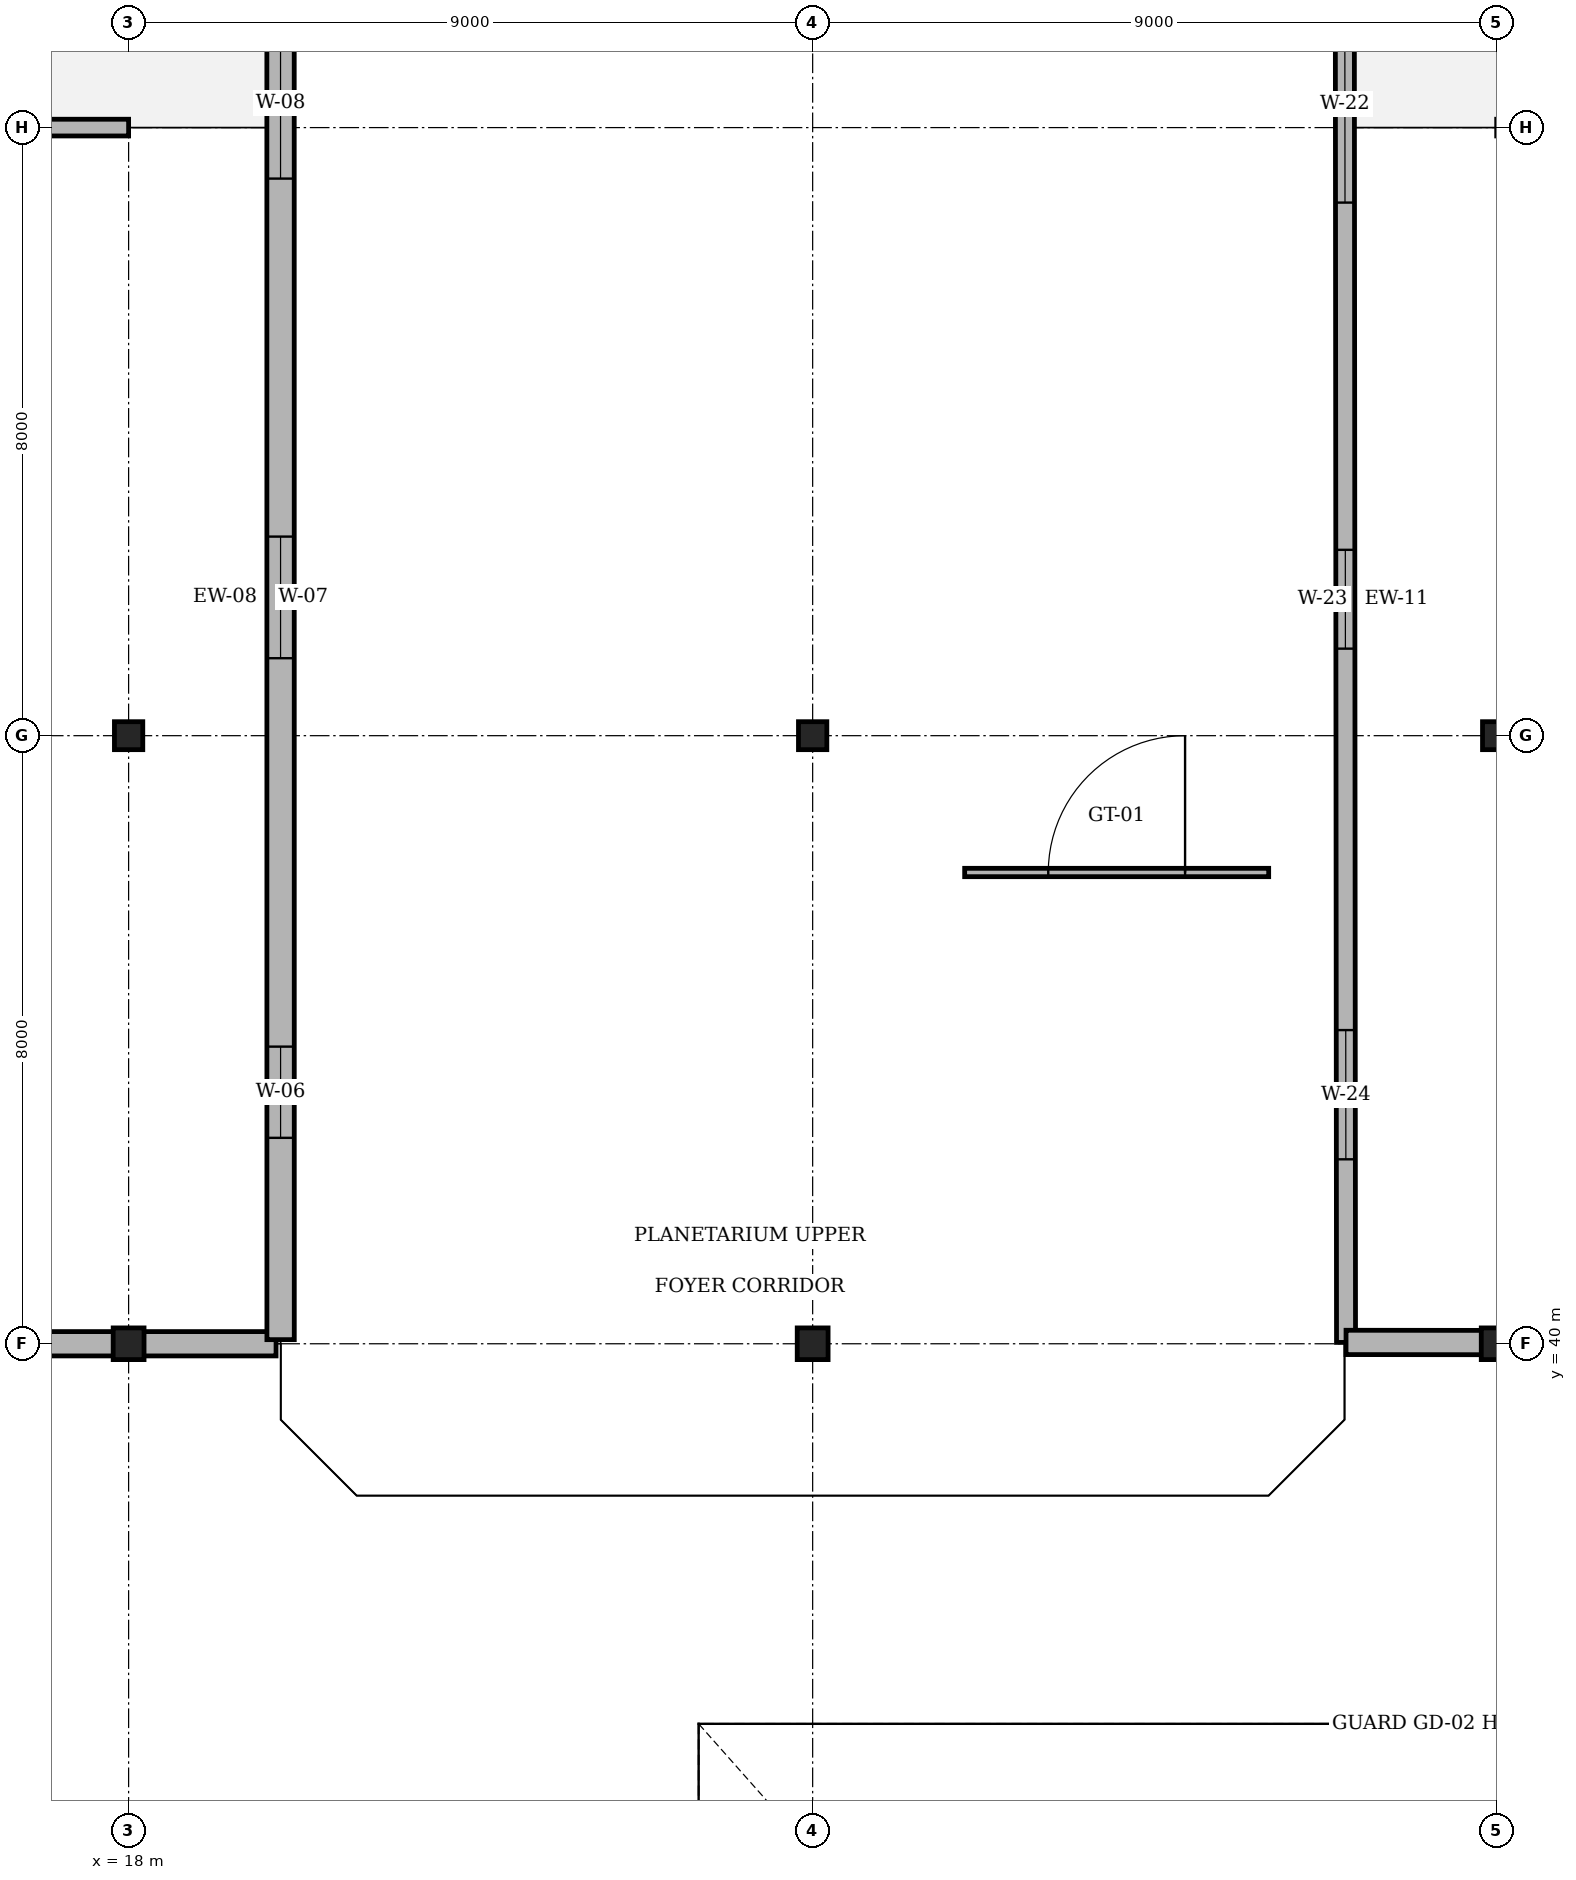
"""IFC4 building model, lengths in metres.
Left out: names, types, materials, properties, quantities, classifications, styles, units other than length and angle.
Written with IfcOpenShell. Run it as: python <this file> out.ifc"""

import sys

from ifc_helpers import new_model, si_unit, direction, frame, frame_2d, origin, origin_2d, place, context, subcontext, project, spatial, rectangle, i_section, extrude, element, fill, save


model = new_model("IFC4")
c1 = context("Model", 3, precision=1e-05, world=origin(), true_north=direction((0.0, 1.0)))
c2 = subcontext(c1, "Body", "Model", "MODEL_VIEW")
j1 = project(units=[si_unit("LENGTHUNIT", "METRE"), si_unit("PLANEANGLEUNIT", "RADIAN")], contexts=[c1])
p1 = place(None, origin())
s1 = spatial("IfcSite", under=j1, at=p1, CompositionType="ELEMENT")
p2 = place(p1, origin())
s2 = spatial("IfcBuilding", under=s1, at=p2, CompositionType="ELEMENT")
p3 = place(p2, frame((0.0, 0.0, 5.4)))
s3 = spatial("IfcBuildingStorey", under=s2, at=p3, CompositionType="ELEMENT", Elevation=5.4)
for number, where, z_axis, x_axis in (
    (1, (18.0, 48.0, 0.0), (0.0, 0.0, 1.0), (1.0, 0.0, 0.0)),
    (2, (27.0, 48.0, 0.0), (0.0, 0.0, 1.0), (1.0, 0.0, 0.0)),
    (3, (36.0, 48.0, 0.0), (0.0, 0.0, 1.0), (1.0, 0.0, 0.0)),
):
    element("IfcColumn", number, at=place(p3, frame(where, z_axis=z_axis, x_axis=x_axis)), inside=s3, PredefinedType="COLUMN", context=c2, shape_type="SweptSolid", body=[
        extrude(i_section(OverallWidth=0.373, OverallDepth=0.368, WebThickness=0.015, FlangeThickness=0.024, FilletRadius=0.015, at=origin_2d()), origin(), (0.0, 0.0, 1.0), 5.4),
    ])
for number, where, z_axis, x_axis in (
    (4, (18.0, 40.0, 0.0), (0.0, 0.0, 1.0), (1.0, 0.0, 0.0)),
    (5, (27.0, 40.0, 0.0), (0.0, 0.0, 1.0), (1.0, 0.0, 0.0)),
    (6, (36.0, 40.0, 0.0), (0.0, 0.0, 1.0), (1.0, 0.0, 0.0)),
):
    element("IfcColumn", number, at=place(p3, frame(where, z_axis=z_axis, x_axis=x_axis)), inside=s3, PredefinedType="COLUMN", context=c2, shape_type="SweptSolid", body=[
        extrude(i_section(OverallWidth=0.406, OverallDepth=0.417, WebThickness=0.03, FlangeThickness=0.044, FilletRadius=0.015, at=origin_2d()), origin(), (0.0, 0.0, 1.0), 5.4),
    ])
p4 = place(p3, frame((11.2, 40.0, 0.0), z_axis=(0.0, 0.0, 1.0), x_axis=(1.0, 0.0, 0.0)))
e7 = element("IfcWall", 7, at=p4, inside=s3, PredefinedType="SOLIDWALL", context=c2, shape_type="SweptSolid", body=[
    extrude(rectangle(XDim=8.74, YDim=0.32, at=frame_2d((4.37, 0.0))), origin(), (0.0, 0.0, 1.0), 4.254),
])
p5 = place(p4, frame((3.17, 0.0, 1.0)))
e8 = element("IfcOpeningElement", 8, at=p5, cuts=e7, PredefinedType="OPENING", context=c2, shape_type="SweptSolid", body=[
    extrude(rectangle(XDim=2.4, YDim=1.8, at=frame_2d((1.2, 0.9))), frame((0.0, 0.17, 0.0), z_axis=(0.0, -1.0, 0.0), x_axis=(1.0, 0.0, 0.0)), (0.0, 0.0, 1.0), 0.34),
])
p6 = place(p3, frame((20.0, 40.054, 0.0), z_axis=(0.0, 0.0, 1.0), x_axis=(-5.000375e-05, 0.99999999875, 0.0)))
e9 = element("IfcWall", 9, at=p6, inside=s3, PredefinedType="SOLIDWALL", context=c2, shape_type="SweptSolid", body=[
    extrude(rectangle(XDim=19.53, YDim=0.36, at=frame_2d((9.765, 0.0))), origin(), (0.0, 0.0, 1.0), 4.264),
])
p7 = place(p6, frame((2.655, 0.0, 1.0)))
e10 = element("IfcOpeningElement", 10, at=p7, cuts=e9, PredefinedType="OPENING", context=c2, shape_type="SweptSolid", body=[
    extrude(rectangle(XDim=1.2, YDim=2.2, at=frame_2d((0.6, 1.1))), frame((0.0, 0.19, 0.0), z_axis=(0.0, -1.0, 0.0), x_axis=(1.0, 0.0, 0.0)), (0.0, 0.0, 1.0), 0.38),
])
p8 = place(p6, frame((8.965, 0.0, 1.0)))
e11 = element("IfcOpeningElement", 11, at=p8, cuts=e9, PredefinedType="OPENING", context=c2, shape_type="SweptSolid", body=[
    extrude(rectangle(XDim=1.6, YDim=2.2, at=frame_2d((0.8, 1.1))), frame((0.0, 0.19, 0.0), z_axis=(0.0, -1.0, 0.0), x_axis=(1.0, 0.0, 0.0)), (0.0, 0.0, 1.0), 0.38),
])
p9 = place(p6, frame((15.275, 0.0, 1.0)))
e12 = element("IfcOpeningElement", 12, at=p9, cuts=e9, PredefinedType="OPENING", context=c2, shape_type="SweptSolid", body=[
    extrude(rectangle(XDim=2.0, YDim=2.2, at=frame_2d((1.0, 1.1))), frame((0.0, 0.19, 0.0), z_axis=(0.0, -1.0, 0.0), x_axis=(1.0, 0.0, 0.0)), (0.0, 0.0, 1.0), 0.38),
])
p10 = place(p3, frame((34.0, 59.573, 0.0), z_axis=(0.0, 0.0, 1.0), x_axis=(0.000898909708, -0.999999595981, 0.0)))
e13 = element("IfcWall", 13, at=p10, inside=s3, PredefinedType="SOLIDWALL", context=c2, shape_type="SweptSolid", body=[
    extrude(rectangle(XDim=19.555, YDim=0.25, at=frame_2d((9.777, 0.0))), origin(), (0.0, 0.0, 1.0), 4.335),
])
p11 = place(p10, frame((1.959, 0.0, 1.0)))
e14 = element("IfcOpeningElement", 14, at=p11, cuts=e13, PredefinedType="OPENING", context=c2, shape_type="SweptSolid", body=[
    extrude(rectangle(XDim=2.6, YDim=2.0, at=frame_2d((1.3, 1.0))), frame((0.0, 0.135, 0.0), z_axis=(0.0, -1.0, 0.0), x_axis=(1.0, 0.0, 0.0)), (0.0, 0.0, 1.0), 0.27),
])
p12 = place(p10, frame((9.127, 0.0, 1.0)))
e15 = element("IfcOpeningElement", 15, at=p12, cuts=e13, PredefinedType="OPENING", context=c2, shape_type="SweptSolid", body=[
    extrude(rectangle(XDim=1.3, YDim=1.5, at=frame_2d((0.65, 0.75))), frame((0.0, 0.135, 0.0), z_axis=(0.0, -1.0, 0.0), x_axis=(1.0, 0.0, 0.0)), (0.0, 0.0, 1.0), 0.27),
])
p13 = place(p10, frame((15.446, 0.0, 1.0)))
e16 = element("IfcOpeningElement", 16, at=p13, cuts=e13, PredefinedType="OPENING", context=c2, shape_type="SweptSolid", body=[
    extrude(rectangle(XDim=1.7, YDim=1.5, at=frame_2d((0.85, 0.75))), frame((0.0, 0.135, 0.0), z_axis=(0.0, -1.0, 0.0), x_axis=(1.0, 0.0, 0.0)), (0.0, 0.0, 1.0), 0.27),
])
p14 = place(p3, frame((34.018, 40.018, 0.0), z_axis=(0.0, 0.0, 1.0), x_axis=(0.999999511426, -0.000988508105, 0.0)))
e17 = element("IfcWall", 17, at=p14, inside=s3, PredefinedType="SOLIDWALL", context=c2, shape_type="SweptSolid", body=[
    extrude(rectangle(XDim=17.782, YDim=0.32, at=frame_2d((8.891, 0.0))), origin(), (0.0, 0.0, 1.0), 4.335),
])
p15 = place(p3, frame((9.0, 56.0, 0.0), z_axis=(0.0, 0.0, 1.0), x_axis=(1.0, 0.0, 0.0)))
e18 = element("IfcWall", 18, at=p15, inside=s3, PredefinedType="PARAPET", context=c2, shape_type="SweptSolid", body=[
    extrude(rectangle(XDim=9.0, YDim=0.22, at=frame_2d((4.5, 0.0))), origin(), (0.0, 0.0, 1.0), 1.1),
])
p16 = place(p3, frame((29.0, 46.2, 0.0), z_axis=(0.0, 0.0, 1.0), x_axis=(1.0, 0.0, 0.0)))
e19 = element("IfcWall", 19, at=p16, inside=s3, PredefinedType="PARTITIONING", context=c2, shape_type="SweptSolid", body=[
    extrude(rectangle(XDim=4.0, YDim=0.11, at=frame_2d((2.0, 0.0))), origin(), (0.0, 0.0, 1.0), 2.55),
])
p17 = place(p16, frame((1.1, 0.0, 0.0)))
e20 = element("IfcOpeningElement", 20, at=p17, cuts=e19, PredefinedType="OPENING", context=c2, shape_type="SweptSolid", body=[
    extrude(rectangle(XDim=1.8, YDim=2.1, at=frame_2d((0.9, 1.05))), frame((0.0, 0.065, 0.0), z_axis=(0.0, -1.0, 0.0), x_axis=(1.0, 0.0, 0.0)), (0.0, 0.0, 1.0), 0.13),
])
p18 = place(p7, origin())
e21 = element("IfcWindow", 21, at=p18, inside=s3, PartitioningType="SINGLE_PANEL", PredefinedType="WINDOW", context=c2, shape_type="SweptSolid", body=[
    extrude(rectangle(XDim=1.2, YDim=2.2, at=frame_2d((0.6, 1.1))), frame((0.0, 0.03, 0.0), z_axis=(0.0, -1.0, 0.0), x_axis=(1.0, 0.0, 0.0)), (0.0, 0.0, 1.0), 0.06),
])
fill(e10, e21)
p19 = place(p8, origin())
e22 = element("IfcWindow", 22, at=p19, inside=s3, PartitioningType="SINGLE_PANEL", PredefinedType="WINDOW", context=c2, shape_type="SweptSolid", body=[
    extrude(rectangle(XDim=1.6, YDim=2.2, at=frame_2d((0.8, 1.1))), frame((0.0, 0.03, 0.0), z_axis=(0.0, -1.0, 0.0), x_axis=(1.0, 0.0, 0.0)), (0.0, 0.0, 1.0), 0.06),
])
fill(e11, e22)
p20 = place(p9, origin())
e23 = element("IfcWindow", 23, at=p20, inside=s3, PartitioningType="SINGLE_PANEL", PredefinedType="WINDOW", context=c2, shape_type="SweptSolid", body=[
    extrude(rectangle(XDim=2.0, YDim=2.2, at=frame_2d((1.0, 1.1))), frame((0.0, 0.03, 0.0), z_axis=(0.0, -1.0, 0.0), x_axis=(1.0, 0.0, 0.0)), (0.0, 0.0, 1.0), 0.06),
])
fill(e12, e23)
p21 = place(p11, origin())
e24 = element("IfcWindow", 24, at=p21, inside=s3, PartitioningType="SINGLE_PANEL", PredefinedType="WINDOW", context=c2, shape_type="SweptSolid", body=[
    extrude(rectangle(XDim=2.6, YDim=2.0, at=frame_2d((1.3, 1.0))), frame((0.0, 0.03, 0.0), z_axis=(0.0, -1.0, 0.0), x_axis=(1.0, 0.0, 0.0)), (0.0, 0.0, 1.0), 0.06),
])
fill(e14, e24)
p22 = place(p12, origin())
e25 = element("IfcWindow", 25, at=p22, inside=s3, PartitioningType="SINGLE_PANEL", PredefinedType="WINDOW", context=c2, shape_type="SweptSolid", body=[
    extrude(rectangle(XDim=1.3, YDim=1.5, at=frame_2d((0.65, 0.75))), frame((0.0, 0.03, 0.0), z_axis=(0.0, -1.0, 0.0), x_axis=(1.0, 0.0, 0.0)), (0.0, 0.0, 1.0), 0.06),
])
fill(e15, e25)
p23 = place(p13, origin())
e26 = element("IfcWindow", 26, at=p23, inside=s3, PartitioningType="SINGLE_PANEL", PredefinedType="WINDOW", context=c2, shape_type="SweptSolid", body=[
    extrude(rectangle(XDim=1.7, YDim=1.5, at=frame_2d((0.85, 0.75))), frame((0.0, 0.03, 0.0), z_axis=(0.0, -1.0, 0.0), x_axis=(1.0, 0.0, 0.0)), (0.0, 0.0, 1.0), 0.06),
])
fill(e16, e26)
p24 = place(p17, origin())
e27 = element("IfcDoor", 27, at=p24, inside=s3, OperationType="SINGLE_SWING_RIGHT", PredefinedType="GATE", context=c2, shape_type="SweptSolid", body=[
    extrude(rectangle(XDim=1.8, YDim=2.1, at=frame_2d((0.9, 1.05))), frame((0.0, 0.025, 0.0), z_axis=(0.0, -1.0, 0.0), x_axis=(1.0, 0.0, 0.0)), (0.0, 0.0, 1.0), 0.05),
])
fill(e20, e27)
save(model, sys.argv[1])
